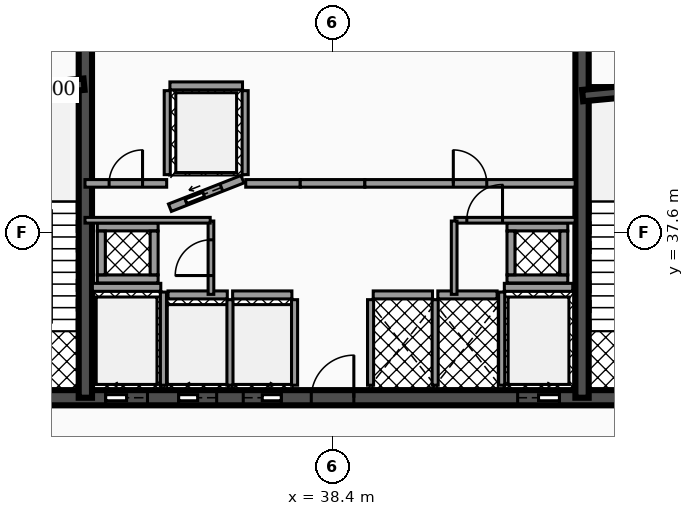
"""IFC4 building model, lengths in metres.
Left out: names, types, materials, properties, quantities, classifications, styles, units other than length and angle.
Written with IfcOpenShell. Run it as: python <this file> out.ifc"""

import sys

from ifc_helpers import new_model, si_unit, direction, frame, frame_2d, origin, place, context, subcontext, project, spatial, rectangle, extrude, element, fill, save


model = new_model("IFC4")
c1 = context("Model", 3, precision=1e-05, world=origin(), true_north=direction((0.0, 1.0)))
c2 = subcontext(c1, "Body", "Model", "MODEL_VIEW")
j1 = project(units=[si_unit("LENGTHUNIT", "METRE"), si_unit("PLANEANGLEUNIT", "RADIAN")], contexts=[c1])
p1 = place(None, origin())
s1 = spatial("IfcSite", under=j1, at=p1, CompositionType="ELEMENT")
p2 = place(p1, origin())
s2 = spatial("IfcBuilding", under=s1, at=p2, CompositionType="ELEMENT")
p3 = place(p2, frame((0.0, 0.0, 119.0)))
s3 = spatial("IfcBuildingStorey", under=s2, at=p3, CompositionType="ELEMENT", Elevation=119.0)
p4 = place(p3, frame((28.4, 33.25, 0.0), z_axis=(0.0, 0.0, 1.0), x_axis=(1.0, 0.0, 0.0)))
e1 = element("IfcWall", 1, at=p4, inside=s3, PredefinedType="SHEAR", context=c2, shape_type="SweptSolid", body=[
    extrude(rectangle(XDim=20.06, YDim=0.4, at=frame_2d((10.03, 0.0))), origin(), (0.0, 0.0, 1.0), 4.18),
])
p5 = place(p4, frame((4.03, 0.0, 0.0)))
e2 = element("IfcOpeningElement", 2, at=p5, cuts=e1, PredefinedType="OPENING", context=c2, shape_type="SweptSolid", body=[
    extrude(rectangle(XDim=1.1, YDim=2.15, at=frame_2d((0.55, 1.075))), frame((0.0, 0.21, 0.0), z_axis=(0.0, -1.0, 0.0), x_axis=(1.0, 0.0, 0.0)), (0.0, 0.0, 1.0), 0.42),
])
p6 = place(p4, frame((14.87, 0.0, 0.0)))
e3 = element("IfcOpeningElement", 3, at=p6, cuts=e1, PredefinedType="OPENING", context=c2, shape_type="SweptSolid", body=[
    extrude(rectangle(XDim=1.1, YDim=2.15, at=frame_2d((0.55, 1.075))), frame((0.0, 0.21, 0.0), z_axis=(0.0, -1.0, 0.0), x_axis=(1.0, 0.0, 0.0)), (0.0, 0.0, 1.0), 0.42),
])
p7 = place(p4, frame((5.95, 0.0, 0.0)))
e4 = element("IfcOpeningElement", 4, at=p7, cuts=e1, PredefinedType="OPENING", context=c2, shape_type="SweptSolid", body=[
    extrude(rectangle(XDim=1.0, YDim=2.1, at=frame_2d((0.5, 1.05))), frame((0.0, 0.21, 0.0), z_axis=(0.0, -1.0, 0.0), x_axis=(1.0, 0.0, 0.0)), (0.0, 0.0, 1.0), 0.42),
])
p8 = place(p4, frame((7.65, 0.0, 0.0)))
e5 = element("IfcOpeningElement", 5, at=p8, cuts=e1, PredefinedType="OPENING", context=c2, shape_type="SweptSolid", body=[
    extrude(rectangle(XDim=1.0, YDim=2.1, at=frame_2d((0.5, 1.05))), frame((0.0, 0.21, 0.0), z_axis=(0.0, -1.0, 0.0), x_axis=(1.0, 0.0, 0.0)), (0.0, 0.0, 1.0), 0.42),
])
p9 = place(p4, frame((1.31, 0.0, 0.0)))
e6 = element("IfcOpeningElement", 6, at=p9, cuts=e1, PredefinedType="OPENING", context=c2, shape_type="SweptSolid", body=[
    extrude(rectangle(XDim=1.1, YDim=2.2, at=frame_2d((0.55, 1.1))), frame((0.0, 0.21, 0.0), z_axis=(0.0, -1.0, 0.0), x_axis=(1.0, 0.0, 0.0)), (0.0, 0.0, 1.0), 0.42),
])
p10 = place(p4, frame((9.44, 0.0, 0.0)))
e7 = element("IfcOpeningElement", 7, at=p10, cuts=e1, PredefinedType="OPENING", context=c2, shape_type="SweptSolid", body=[
    extrude(rectangle(XDim=1.12, YDim=2.05, at=frame_2d((0.56, 1.025))), frame((0.0, 0.21, 0.0), z_axis=(0.0, -1.0, 0.0), x_axis=(1.0, 0.0, 0.0)), (0.0, 0.0, 1.0), 0.42),
])
p11 = place(p4, frame((17.65, 0.0, 0.0)))
e8 = element("IfcOpeningElement", 8, at=p11, cuts=e1, PredefinedType="OPENING", context=c2, shape_type="SweptSolid", body=[
    extrude(rectangle(XDim=1.1, YDim=2.2, at=frame_2d((0.55, 1.1))), frame((0.0, 0.21, 0.0), z_axis=(0.0, -1.0, 0.0), x_axis=(1.0, 0.0, 0.0)), (0.0, 0.0, 1.0), 0.42),
])
for number, where, z_axis, x_axis in (
    (9, (31.895, 33.25, 0.0), (0.0, 0.0, 1.0), (0.0, 1.0, 0.0)),
    (10, (44.965, 33.25, 0.0), (0.0, 0.0, 1.0), (0.0, 1.0, 0.0)),
):
    element("IfcWall", number, at=place(p3, frame(where, z_axis=z_axis, x_axis=x_axis)), inside=s3, PredefinedType="SHEAR", context=c2, shape_type="SweptSolid", body=[
        extrude(rectangle(XDim=10.2, YDim=0.35, at=frame_2d((5.1, 0.0))), origin(), (0.0, 0.0, 1.0), 4.18),
    ])
p12 = place(p3, frame((28.64, 41.2, 0.0), z_axis=(0.0, 0.0, 1.0), x_axis=(0.995687118776, 0.092774789157, 0.0)))
e11 = element("IfcWall", 11, at=p12, inside=s3, PredefinedType="SHEAR", context=c2, shape_type="SweptSolid", body=[
    extrude(rectangle(XDim=3.234, YDim=0.3, at=frame_2d((1.617, 0.0))), origin(), (0.0, 0.0, 1.0), 4.18),
])
p13 = place(p3, frame((44.98, 41.2, 0.0), z_axis=(0.0, 0.0, 1.0), x_axis=(0.995686468965, 0.09278176286, 0.0)))
e12 = element("IfcWall", 12, at=p13, inside=s3, PredefinedType="SHEAR", context=c2, shape_type="SweptSolid", body=[
    extrude(rectangle(XDim=3.234, YDim=0.3, at=frame_2d((1.617, 0.0))), origin(), (0.0, 0.0, 1.0), 4.18),
])
p14 = place(p3, frame((32.08, 36.155, 0.0), z_axis=(0.0, 0.0, 1.0), x_axis=(1.0, 0.0, 0.0)))
e13 = element("IfcWall", 13, at=p14, inside=s3, PredefinedType="SOLIDWALL", context=c2, shape_type="SweptSolid", body=[
    extrude(rectangle(XDim=1.8, YDim=0.21, at=frame_2d((0.9, 0.0))), origin(), (0.0, 0.0, 1.0), 3.152),
])
p15 = place(p3, frame((33.95, 33.58, 0.0), z_axis=(0.0, 0.0, 1.0), x_axis=(0.0, 1.0, 0.0)))
e14 = element("IfcWall", 14, at=p15, inside=s3, PredefinedType="SOLIDWALL", context=c2, shape_type="SweptSolid", body=[
    extrude(rectangle(XDim=2.45, YDim=0.16, at=frame_2d((1.225, 0.0))), origin(), (0.0, 0.0, 1.0), 3.152),
])
p16 = place(p3, frame((42.92, 36.155, 0.0), z_axis=(0.0, 0.0, 1.0), x_axis=(1.0, 0.0, 0.0)))
e15 = element("IfcWall", 15, at=p16, inside=s3, PredefinedType="SOLIDWALL", context=c2, shape_type="SweptSolid", body=[
    extrude(rectangle(XDim=1.8, YDim=0.21, at=frame_2d((0.9, 0.0))), origin(), (0.0, 0.0, 1.0), 3.152),
])
p17 = place(p3, frame((42.85, 33.58, 0.0), z_axis=(0.0, 0.0, 1.0), x_axis=(0.0, 1.0, 0.0)))
e16 = element("IfcWall", 16, at=p17, inside=s3, PredefinedType="SOLIDWALL", context=c2, shape_type="SweptSolid", body=[
    extrude(rectangle(XDim=2.45, YDim=0.16, at=frame_2d((1.225, 0.0))), origin(), (0.0, 0.0, 1.0), 3.152),
])
p18 = place(p3, frame((34.07, 35.955, 0.0), z_axis=(0.0, 0.0, 1.0), x_axis=(1.0, 0.0, 0.0)))
e17 = element("IfcWall", 17, at=p18, inside=s3, PredefinedType="SOLIDWALL", context=c2, shape_type="SweptSolid", body=[
    extrude(rectangle(XDim=1.56, YDim=0.21, at=frame_2d((0.78, 0.0))), origin(), (0.0, 0.0, 1.0), 3.152),
])
p19 = place(p3, frame((35.7, 33.58, 0.0), z_axis=(0.0, 0.0, 1.0), x_axis=(0.0, 1.0, 0.0)))
e18 = element("IfcWall", 18, at=p19, inside=s3, PredefinedType="SOLIDWALL", context=c2, shape_type="SweptSolid", body=[
    extrude(rectangle(XDim=2.25, YDim=0.16, at=frame_2d((1.125, 0.0))), origin(), (0.0, 0.0, 1.0), 3.152),
])
p20 = place(p3, frame((35.77, 35.955, 0.0), z_axis=(0.0, 0.0, 1.0), x_axis=(1.0, 0.0, 0.0)))
e19 = element("IfcWall", 19, at=p20, inside=s3, PredefinedType="SOLIDWALL", context=c2, shape_type="SweptSolid", body=[
    extrude(rectangle(XDim=1.56, YDim=0.21, at=frame_2d((0.78, 0.0))), origin(), (0.0, 0.0, 1.0), 3.152),
])
p21 = place(p3, frame((37.4, 33.58, 0.0), z_axis=(0.0, 0.0, 1.0), x_axis=(0.0, 1.0, 0.0)))
e20 = element("IfcWall", 20, at=p21, inside=s3, PredefinedType="SOLIDWALL", context=c2, shape_type="SweptSolid", body=[
    extrude(rectangle(XDim=2.25, YDim=0.16, at=frame_2d((1.125, 0.0))), origin(), (0.0, 0.0, 1.0), 3.152),
])
p22 = place(p3, frame((34.12, 38.25, 0.0), z_axis=(0.0, 0.0, 1.0), x_axis=(0.930804993012, 0.36551616241, 0.0)))
e21 = element("IfcWall", 21, at=p22, inside=s3, PredefinedType="SOLIDWALL", context=c2, shape_type="SweptSolid", body=[
    extrude(rectangle(XDim=2.052, YDim=0.21, at=frame_2d((1.026, 0.0))), origin(), (0.0, 0.0, 1.0), 3.152),
])
p23 = place(p22, frame((0.455, 0.0, 0.0)))
e22 = element("IfcOpeningElement", 22, at=p23, cuts=e21, PredefinedType="OPENING", context=c2, shape_type="SweptSolid", body=[
    extrude(rectangle(XDim=1.0, YDim=2.1, at=frame_2d((0.5, 1.05))), frame((0.0, 0.115, 0.0), z_axis=(0.0, -1.0, 0.0), x_axis=(1.0, 0.0, 0.0)), (0.0, 0.0, 1.0), 0.23),
])
p24 = place(p3, frame((34.12, 41.455, 0.0), z_axis=(0.0, 0.0, 1.0), x_axis=(1.0, 0.0, 0.0)))
e23 = element("IfcWall", 23, at=p24, inside=s3, PredefinedType="SOLIDWALL", context=c2, shape_type="SweptSolid", body=[
    extrude(rectangle(XDim=1.91, YDim=0.21, at=frame_2d((0.955, 0.0))), origin(), (0.0, 0.0, 1.0), 3.152),
])
for number, where, z_axis, x_axis in (
    (24, (34.05, 39.12, 0.0), (0.0, 0.0, 1.0), (0.0, 1.0, 0.0)),
    (25, (36.1, 39.12, 0.0), (0.0, 0.0, 1.0), (0.0, 1.0, 0.0)),
):
    element("IfcWall", number, at=place(p3, frame(where, z_axis=z_axis, x_axis=x_axis)), inside=s3, PredefinedType="SOLIDWALL", context=c2, shape_type="SweptSolid", body=[
        extrude(rectangle(XDim=2.21, YDim=0.16, at=frame_2d((1.105, 0.0))), origin(), (0.0, 0.0, 1.0), 3.152),
    ])
p25 = place(p3, frame((39.47, 35.955, 0.0), z_axis=(0.0, 0.0, 1.0), x_axis=(1.0, 0.0, 0.0)))
e26 = element("IfcWall", 26, at=p25, inside=s3, PredefinedType="SOLIDWALL", context=c2, shape_type="SweptSolid", body=[
    extrude(rectangle(XDim=1.56, YDim=0.21, at=frame_2d((0.78, 0.0))), origin(), (0.0, 0.0, 1.0), 3.152),
])
for number, where, z_axis, x_axis in (
    (27, (39.4, 33.58, 0.0), (0.0, 0.0, 1.0), (0.0, 1.0, 0.0)),
    (28, (41.1, 33.58, 0.0), (0.0, 0.0, 1.0), (0.0, 1.0, 0.0)),
):
    element("IfcWall", number, at=place(p3, frame(where, z_axis=z_axis, x_axis=x_axis)), inside=s3, PredefinedType="SOLIDWALL", context=c2, shape_type="SweptSolid", body=[
        extrude(rectangle(XDim=2.25, YDim=0.16, at=frame_2d((1.125, 0.0))), origin(), (0.0, 0.0, 1.0), 3.152),
    ])
p26 = place(p3, frame((41.17, 35.955, 0.0), z_axis=(0.0, 0.0, 1.0), x_axis=(1.0, 0.0, 0.0)))
e29 = element("IfcWall", 29, at=p26, inside=s3, PredefinedType="SOLIDWALL", context=c2, shape_type="SweptSolid", body=[
    extrude(rectangle(XDim=1.56, YDim=0.21, at=frame_2d((0.78, 0.0))), origin(), (0.0, 0.0, 1.0), 3.152),
])
for number, where, z_axis, x_axis in (
    (30, (32.21, 36.375, 0.0), (0.0, 0.0, 1.0), (1.0, 0.0, 0.0)),
    (31, (32.21, 37.745, 0.0), (0.0, 0.0, 1.0), (1.0, 0.0, 0.0)),
):
    element("IfcWall", number, at=place(p3, frame(where, z_axis=z_axis, x_axis=x_axis)), inside=s3, PredefinedType="SOLIDWALL", context=c2, shape_type="SweptSolid", body=[
        extrude(rectangle(XDim=1.6, YDim=0.21, at=frame_2d((0.8, 0.0))), origin(), (0.0, 0.0, 1.0), 4.18),
    ])
for number, where, z_axis, x_axis in (
    (32, (32.315, 36.485, 0.0), (0.0, 0.0, 1.0), (0.0, 1.0, 0.0)),
    (33, (33.705, 36.485, 0.0), (0.0, 0.0, 1.0), (0.0, 1.0, 0.0)),
):
    element("IfcWall", number, at=place(p3, frame(where, z_axis=z_axis, x_axis=x_axis)), inside=s3, PredefinedType="SOLIDWALL", context=c2, shape_type="SweptSolid", body=[
        extrude(rectangle(XDim=1.15, YDim=0.21, at=frame_2d((0.575, 0.0))), origin(), (0.0, 0.0, 1.0), 4.18),
    ])
for number, where, z_axis, x_axis in (
    (34, (42.99, 36.375, 0.0), (0.0, 0.0, 1.0), (1.0, 0.0, 0.0)),
    (35, (42.99, 37.745, 0.0), (0.0, 0.0, 1.0), (1.0, 0.0, 0.0)),
):
    element("IfcWall", number, at=place(p3, frame(where, z_axis=z_axis, x_axis=x_axis)), inside=s3, PredefinedType="SOLIDWALL", context=c2, shape_type="SweptSolid", body=[
        extrude(rectangle(XDim=1.6, YDim=0.21, at=frame_2d((0.8, 0.0))), origin(), (0.0, 0.0, 1.0), 4.18),
    ])
for number, where, z_axis, x_axis in (
    (36, (43.095, 36.485, 0.0), (0.0, 0.0, 1.0), (0.0, 1.0, 0.0)),
    (37, (44.485, 36.485, 0.0), (0.0, 0.0, 1.0), (0.0, 1.0, 0.0)),
):
    element("IfcWall", number, at=place(p3, frame(where, z_axis=z_axis, x_axis=x_axis)), inside=s3, PredefinedType="SOLIDWALL", context=c2, shape_type="SweptSolid", body=[
        extrude(rectangle(XDim=1.15, YDim=0.21, at=frame_2d((0.575, 0.0))), origin(), (0.0, 0.0, 1.0), 4.18),
    ])
p27 = place(p3, frame((35.2, 35.97, 0.0), z_axis=(0.0, 0.0, 1.0), x_axis=(0.0, 1.0, 0.0)))
e38 = element("IfcWall", 38, at=p27, inside=s3, PredefinedType="PARTITIONING", context=c2, shape_type="SweptSolid", body=[
    extrude(rectangle(XDim=1.93, YDim=0.15, at=frame_2d((0.965, 0.0))), origin(), (0.0, 0.0, 1.0), 3.137),
])
p28 = place(p27, frame((0.495, 0.0, 0.0)))
e39 = element("IfcOpeningElement", 39, at=p28, cuts=e38, PredefinedType="OPENING", context=c2, shape_type="SweptSolid", body=[
    extrude(rectangle(XDim=0.94, YDim=2.05, at=frame_2d((0.47, 1.025))), frame((0.0, 0.085, 0.0), z_axis=(0.0, -1.0, 0.0), x_axis=(1.0, 0.0, 0.0)), (0.0, 0.0, 1.0), 0.17),
])
p29 = place(p3, frame((31.885, 37.92, 0.0), z_axis=(0.0, 0.0, 1.0), x_axis=(1.0, 0.0, 0.0)))
e40 = element("IfcWall", 40, at=p29, inside=s3, PredefinedType="PARTITIONING", context=c2, shape_type="SweptSolid", body=[
    extrude(rectangle(XDim=3.295, YDim=0.15, at=frame_2d((1.647, 0.0))), origin(), (0.0, 0.0, 1.0), 3.137),
])
p30 = place(p3, frame((31.885, 38.89, 0.0), z_axis=(0.0, 0.0, 1.0), x_axis=(1.0, 0.0, 0.0)))
e41 = element("IfcWall", 41, at=p30, inside=s3, PredefinedType="PARTITIONING", context=c2, shape_type="SweptSolid", body=[
    extrude(rectangle(XDim=2.15, YDim=0.2, at=frame_2d((1.075, 0.0))), origin(), (0.0, 0.0, 1.0), 3.137),
])
p31 = place(p30, frame((0.635, 0.0, 0.0)))
e42 = element("IfcOpeningElement", 42, at=p31, cuts=e41, PredefinedType="OPENING", context=c2, shape_type="SweptSolid", body=[
    extrude(rectangle(XDim=0.88, YDim=2.05, at=frame_2d((0.44, 1.025))), frame((0.0, 0.11, 0.0), z_axis=(0.0, -1.0, 0.0), x_axis=(1.0, 0.0, 0.0)), (0.0, 0.0, 1.0), 0.22),
])
p32 = place(p3, frame((36.115, 38.89, 0.0), z_axis=(0.0, 0.0, 1.0), x_axis=(1.0, 0.0, 0.0)))
e43 = element("IfcWall", 43, at=p32, inside=s3, PredefinedType="PARTITIONING", context=c2, shape_type="SweptSolid", body=[
    extrude(rectangle(XDim=1.435, YDim=0.2, at=frame_2d((0.718, 0.0))), origin(), (0.0, 0.0, 1.0), 3.137),
])
p33 = place(p3, frame((37.55, 38.89, 0.0), z_axis=(0.0, 0.0, 1.0), x_axis=(1.0, 0.0, 0.0)))
e44 = element("IfcWall", 44, at=p33, inside=s3, PredefinedType="PARTITIONING", context=c2, shape_type="SweptSolid", body=[
    extrude(rectangle(XDim=1.7, YDim=0.2, at=frame_2d((0.85, 0.0))), origin(), (0.0, 0.0, 1.0), 3.137),
])
p34 = place(p3, frame((39.25, 38.89, 0.0), z_axis=(0.0, 0.0, 1.0), x_axis=(1.0, 0.0, 0.0)))
e45 = element("IfcWall", 45, at=p34, inside=s3, PredefinedType="PARTITIONING", context=c2, shape_type="SweptSolid", body=[
    extrude(rectangle(XDim=5.535, YDim=0.2, at=frame_2d((2.768, 0.0))), origin(), (0.0, 0.0, 1.0), 3.137),
])
p35 = place(p34, frame((2.327, 0.0, 0.0)))
e46 = element("IfcOpeningElement", 46, at=p35, cuts=e45, PredefinedType="OPENING", context=c2, shape_type="SweptSolid", body=[
    extrude(rectangle(XDim=0.88, YDim=2.05, at=frame_2d((0.44, 1.025))), frame((0.0, 0.11, 0.0), z_axis=(0.0, -1.0, 0.0), x_axis=(1.0, 0.0, 0.0)), (0.0, 0.0, 1.0), 0.22),
])
p36 = place(p3, frame((41.62, 37.92, 0.0), z_axis=(0.0, 0.0, 1.0), x_axis=(1.0, 0.0, 0.0)))
e47 = element("IfcWall", 47, at=p36, inside=s3, PredefinedType="PARTITIONING", context=c2, shape_type="SweptSolid", body=[
    extrude(rectangle(XDim=3.165, YDim=0.15, at=frame_2d((1.583, 0.0))), origin(), (0.0, 0.0, 1.0), 3.137),
])
p37 = place(p36, frame((0.312, 0.0, 0.0)))
e48 = element("IfcOpeningElement", 48, at=p37, cuts=e47, PredefinedType="OPENING", context=c2, shape_type="SweptSolid", body=[
    extrude(rectangle(XDim=0.94, YDim=2.05, at=frame_2d((0.47, 1.025))), frame((0.0, 0.085, 0.0), z_axis=(0.0, -1.0, 0.0), x_axis=(1.0, 0.0, 0.0)), (0.0, 0.0, 1.0), 0.17),
])
p38 = place(p3, frame((41.6, 35.97, 0.0), z_axis=(0.0, 0.0, 1.0), x_axis=(0.0, 1.0, 0.0)))
e49 = element("IfcWall", 49, at=p38, inside=s3, PredefinedType="PARTITIONING", context=c2, shape_type="SweptSolid", body=[
    extrude(rectangle(XDim=1.93, YDim=0.15, at=frame_2d((0.965, 0.0))), origin(), (0.0, 0.0, 1.0), 3.137),
])
p39 = place(p5, origin())
e50 = element("IfcDoor", 50, at=p39, inside=s3, OperationType="SLIDING_TO_LEFT", PredefinedType="DOOR", context=c2, shape_type="SweptSolid", body=[
    extrude(rectangle(XDim=1.1, YDim=2.15, at=frame_2d((0.55, 1.075))), frame((0.0, 0.025, 0.0), z_axis=(0.0, -1.0, 0.0), x_axis=(1.0, 0.0, 0.0)), (0.0, 0.0, 1.0), 0.05),
])
fill(e2, e50)
p40 = place(p6, origin())
e51 = element("IfcDoor", 51, at=p40, inside=s3, OperationType="SLIDING_TO_RIGHT", PredefinedType="DOOR", context=c2, shape_type="SweptSolid", body=[
    extrude(rectangle(XDim=1.1, YDim=2.15, at=frame_2d((0.55, 1.075))), frame((0.0, 0.025, 0.0), z_axis=(0.0, -1.0, 0.0), x_axis=(1.0, 0.0, 0.0)), (0.0, 0.0, 1.0), 0.05),
])
fill(e3, e51)
p41 = place(p7, origin())
e52 = element("IfcDoor", 52, at=p41, inside=s3, OperationType="SLIDING_TO_LEFT", PredefinedType="DOOR", context=c2, shape_type="SweptSolid", body=[
    extrude(rectangle(XDim=1.0, YDim=2.1, at=frame_2d((0.5, 1.05))), frame((0.0, 0.025, 0.0), z_axis=(0.0, -1.0, 0.0), x_axis=(1.0, 0.0, 0.0)), (0.0, 0.0, 1.0), 0.05),
])
fill(e4, e52)
p42 = place(p8, origin())
e53 = element("IfcDoor", 53, at=p42, inside=s3, OperationType="SLIDING_TO_RIGHT", PredefinedType="DOOR", context=c2, shape_type="SweptSolid", body=[
    extrude(rectangle(XDim=1.0, YDim=2.1, at=frame_2d((0.5, 1.05))), frame((0.0, 0.025, 0.0), z_axis=(0.0, -1.0, 0.0), x_axis=(1.0, 0.0, 0.0)), (0.0, 0.0, 1.0), 0.05),
])
fill(e5, e53)
p43 = place(p23, origin())
e54 = element("IfcDoor", 54, at=p43, inside=s3, OperationType="SLIDING_TO_LEFT", PredefinedType="DOOR", context=c2, shape_type="SweptSolid", body=[
    extrude(rectangle(XDim=1.0, YDim=2.1, at=frame_2d((0.5, 1.05))), frame((0.0, 0.025, 0.0), z_axis=(0.0, -1.0, 0.0), x_axis=(1.0, 0.0, 0.0)), (0.0, 0.0, 1.0), 0.05),
])
fill(e22, e54)
p44 = place(p10, origin())
e55 = element("IfcDoor", 55, at=p44, inside=s3, OperationType="SINGLE_SWING_RIGHT", PredefinedType="DOOR", context=c2, shape_type="SweptSolid", body=[
    extrude(rectangle(XDim=1.12, YDim=2.05, at=frame_2d((0.56, 1.025))), frame((0.0, 0.025, 0.0), z_axis=(0.0, -1.0, 0.0), x_axis=(1.0, 0.0, 0.0)), (0.0, 0.0, 1.0), 0.05),
])
fill(e7, e55)
p45 = place(p28, origin())
e56 = element("IfcDoor", 56, at=p45, inside=s3, OperationType="SINGLE_SWING_LEFT", PredefinedType="DOOR", context=c2, shape_type="SweptSolid", body=[
    extrude(rectangle(XDim=0.94, YDim=2.05, at=frame_2d((0.47, 1.025))), frame((0.0, 0.025, 0.0), z_axis=(0.0, -1.0, 0.0), x_axis=(1.0, 0.0, 0.0)), (0.0, 0.0, 1.0), 0.05),
])
fill(e39, e56)
p46 = place(p31, origin())
e57 = element("IfcDoor", 57, at=p46, inside=s3, OperationType="SINGLE_SWING_RIGHT", PredefinedType="DOOR", context=c2, shape_type="SweptSolid", body=[
    extrude(rectangle(XDim=0.88, YDim=2.05, at=frame_2d((0.44, 1.025))), frame((0.0, 0.025, 0.0), z_axis=(0.0, -1.0, 0.0), x_axis=(1.0, 0.0, 0.0)), (0.0, 0.0, 1.0), 0.05),
])
fill(e42, e57)
p47 = place(p35, origin())
e58 = element("IfcDoor", 58, at=p47, inside=s3, OperationType="SINGLE_SWING_LEFT", PredefinedType="DOOR", context=c2, shape_type="SweptSolid", body=[
    extrude(rectangle(XDim=0.88, YDim=2.05, at=frame_2d((0.44, 1.025))), frame((0.0, 0.025, 0.0), z_axis=(0.0, -1.0, 0.0), x_axis=(1.0, 0.0, 0.0)), (0.0, 0.0, 1.0), 0.05),
])
fill(e46, e58)
p48 = place(p37, origin())
e59 = element("IfcDoor", 59, at=p48, inside=s3, OperationType="SINGLE_SWING_RIGHT", PredefinedType="DOOR", context=c2, shape_type="SweptSolid", body=[
    extrude(rectangle(XDim=0.94, YDim=2.05, at=frame_2d((0.47, 1.025))), frame((0.0, 0.025, 0.0), z_axis=(0.0, -1.0, 0.0), x_axis=(1.0, 0.0, 0.0)), (0.0, 0.0, 1.0), 0.05),
])
fill(e48, e59)
save(model, sys.argv[1])
